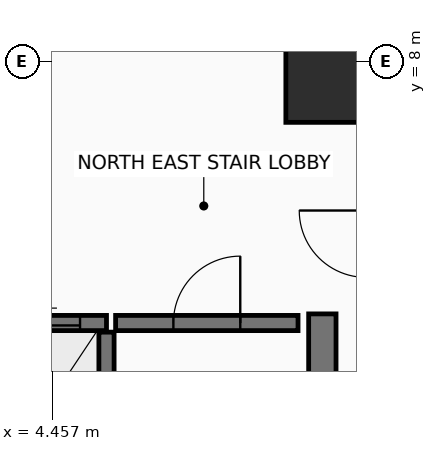
"""IFC4 building model, lengths in metres.
Left out: names, types, materials, properties, quantities, classifications, styles, units other than length and angle.
Written with IfcOpenShell. Run it as: python <this file> out.ifc"""

import sys

from ifc_helpers import new_model, si_unit, direction, frame, frame_2d, origin, origin_2d, place, context, subcontext, project, spatial, rectangle, extrude, element, fill, save


model = new_model("IFC4")
c1 = context("Model", 3, precision=1e-05, world=origin(), true_north=direction((0.0, 1.0)))
c2 = subcontext(c1, "Body", "Model", "MODEL_VIEW")
j1 = project(units=[si_unit("LENGTHUNIT", "METRE"), si_unit("PLANEANGLEUNIT", "RADIAN")], contexts=[c1])
p1 = place(None, origin())
s1 = spatial("IfcSite", under=j1, at=p1, CompositionType="ELEMENT")
p2 = place(p1, origin())
s2 = spatial("IfcBuilding", under=s1, at=p2, CompositionType="ELEMENT")
p3 = place(p2, frame((0.0, 0.0, 214.85)))
s3 = spatial("IfcBuildingStorey", under=s2, at=p3, CompositionType="ELEMENT", Elevation=214.85)
p4 = place(p3, frame((8.9, 7.6, 0.0), z_axis=(0.0, 0.0, 1.0), x_axis=(1.0, 0.0, 0.0)))
e1 = element("IfcColumn", 1, at=p4, inside=s3, PredefinedType="COLUMN", context=c2, shape_type="SweptSolid", body=[
    extrude(rectangle(XDim=1.2, YDim=1.2, at=origin_2d()), origin(), (0.0, 0.0, 1.0), 3.6),
])
p5 = place(p3, frame((8.9, -6.85, 0.0), z_axis=(0.0, 0.0, 1.0), x_axis=(0.0, 1.0, 0.0)))
e2 = element("IfcWall", 2, at=p5, inside=s3, PredefinedType="SHEAR", context=c2, shape_type="SweptSolid", body=[
    extrude(rectangle(XDim=10.7, YDim=0.45, at=frame_2d((5.35, 0.0))), origin(), (0.0, 0.0, 1.0), 3.42),
])
p6 = place(p3, frame((5.35, -3.75, 0.0), z_axis=(0.0, 0.0, 1.0), x_axis=(0.0, 1.0, 0.0)))
e3 = element("IfcWall", 3, at=p6, inside=s3, PredefinedType="SHEAR", context=c2, shape_type="SweptSolid", body=[
    extrude(rectangle(XDim=7.3, YDim=0.25, at=frame_2d((3.65, 0.0))), origin(), (0.0, 0.0, 1.0), 3.42),
])
p7 = place(p3, frame((5.5, 3.7, 0.0), z_axis=(0.0, 0.0, 1.0), x_axis=(1.0, 0.0, 0.0)))
e4 = element("IfcWall", 4, at=p7, inside=s3, PredefinedType="SHEAR", context=c2, shape_type="SweptSolid", body=[
    extrude(rectangle(XDim=3.0, YDim=0.25, at=frame_2d((1.5, 0.0))), origin(), (0.0, 0.0, 1.0), 3.42),
])
p8 = place(p7, frame((0.95, 0.0, 0.0)))
e5 = element("IfcOpeningElement", 5, at=p8, cuts=e4, PredefinedType="OPENING", context=c2, shape_type="SweptSolid", body=[
    extrude(rectangle(XDim=1.1, YDim=2.15, at=frame_2d((0.55, 1.075))), frame((0.0, 0.135, 0.0), z_axis=(0.0, -1.0, 0.0), x_axis=(1.0, 0.0, 0.0)), (0.0, 0.0, 1.0), 0.27),
])
p9 = place(p3, frame((3.28, 3.7, 0.0), z_axis=(0.0, 0.0, 1.0), x_axis=(1.0, 0.0, 0.0)))
e6 = element("IfcWall", 6, at=p9, inside=s3, PredefinedType="SHEAR", context=c2, shape_type="SweptSolid", body=[
    extrude(rectangle(XDim=2.07, YDim=0.25, at=frame_2d((1.035, 0.0))), origin(), (0.0, 0.0, 1.0), 3.42),
])
p10 = place(p9, frame((0.435, 0.0, 0.0)))
e7 = element("IfcOpeningElement", 7, at=p10, cuts=e6, PredefinedType="OPENING", context=c2, shape_type="SweptSolid", body=[
    extrude(rectangle(XDim=1.2, YDim=2.2, at=frame_2d((0.6, 1.1))), frame((0.0, 0.135, 0.0), z_axis=(0.0, -1.0, 0.0), x_axis=(1.0, 0.0, 0.0)), (0.0, 0.0, 1.0), 0.27),
])
p11 = place(p8, frame((1.1, 0.0, 0.0), z_axis=(0.0, 0.0, 1.0), x_axis=(-1.0, 0.0, 0.0)))
e8 = element("IfcDoor", 8, at=p11, inside=s3, OperationType="SINGLE_SWING_LEFT", PredefinedType="DOOR", context=c2, shape_type="SweptSolid", body=[
    extrude(rectangle(XDim=1.1, YDim=2.15, at=frame_2d((0.55, 1.075))), frame((0.0, 0.025, 0.0), z_axis=(0.0, -1.0, 0.0), x_axis=(1.0, 0.0, 0.0)), (0.0, 0.0, 1.0), 0.05),
])
fill(e5, e8)
p12 = place(p10, origin())
e9 = element("IfcDoor", 9, at=p12, inside=s3, OperationType="SLIDING_TO_RIGHT", PredefinedType="DOOR", context=c2, shape_type="SweptSolid", body=[
    extrude(rectangle(XDim=1.2, YDim=2.2, at=frame_2d((0.6, 1.1))), frame((0.0, 0.025, 0.0), z_axis=(0.0, -1.0, 0.0), x_axis=(1.0, 0.0, 0.0)), (0.0, 0.0, 1.0), 0.05),
])
fill(e7, e9)
save(model, sys.argv[1])
